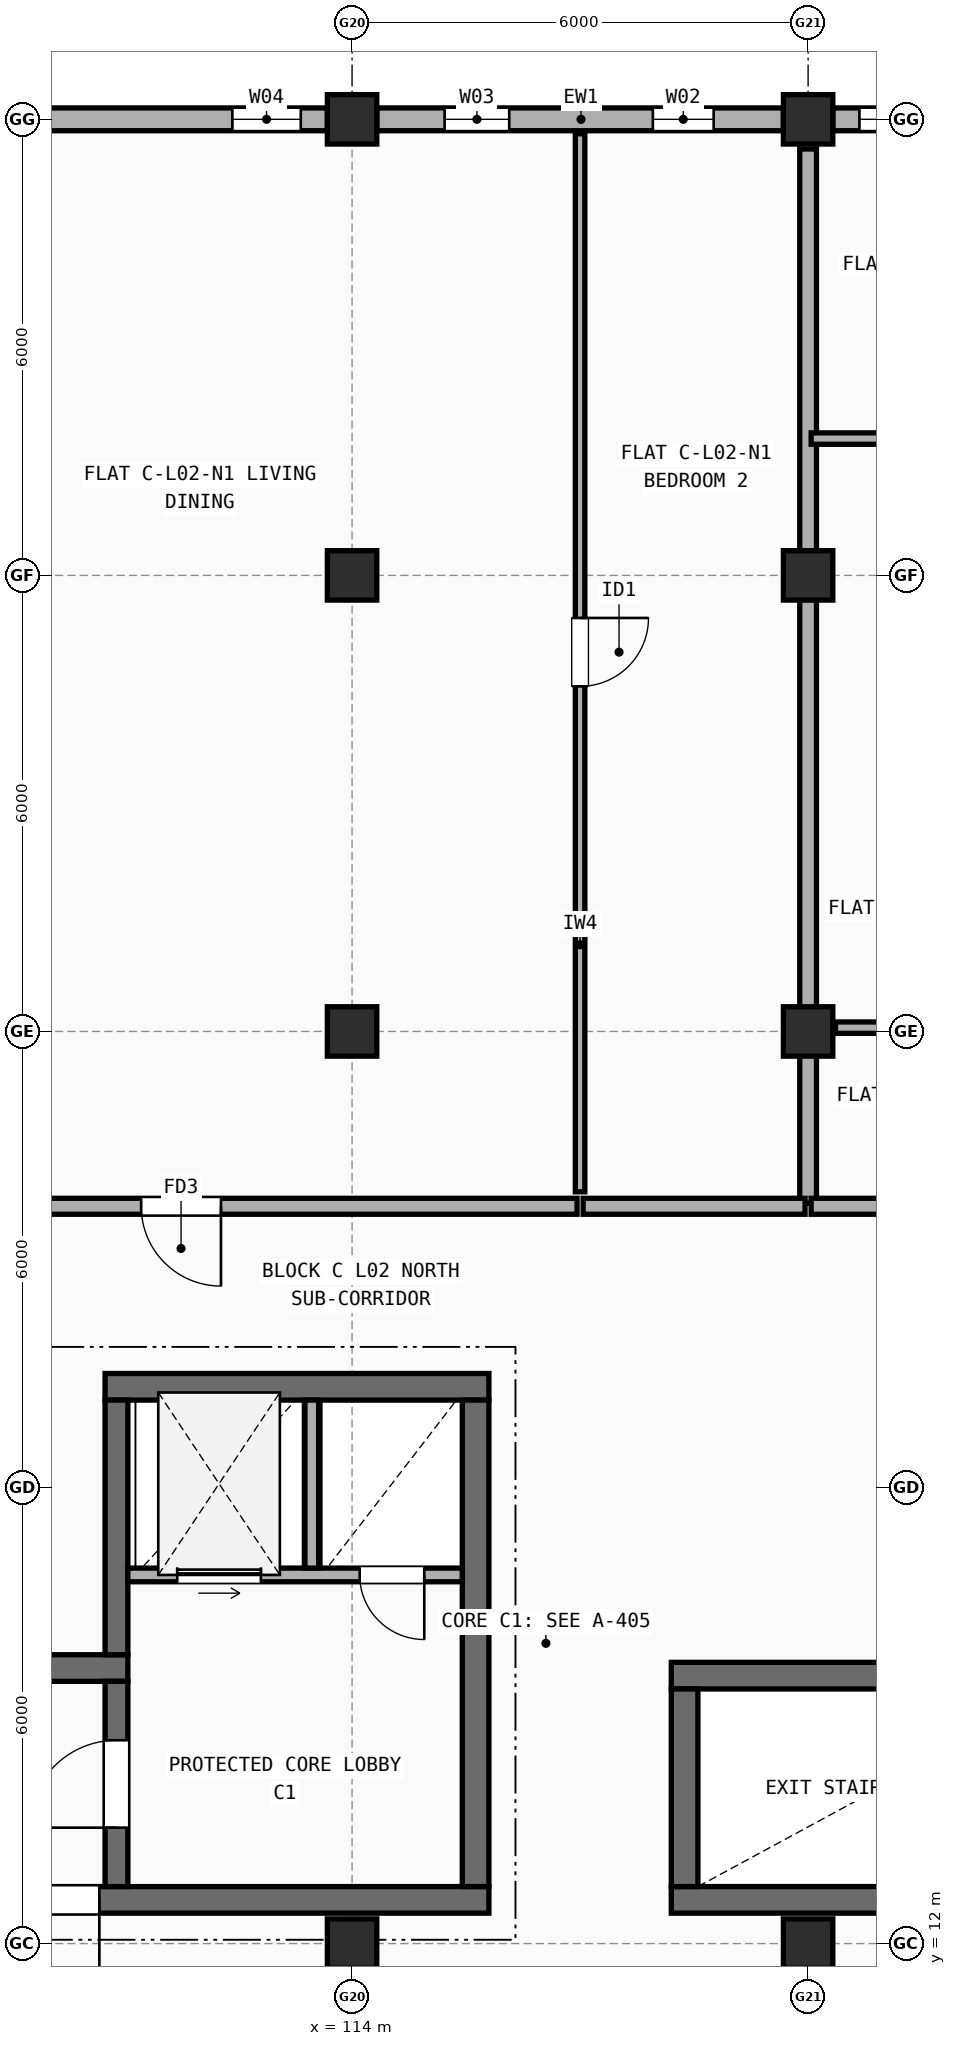
"""IFC4 building model, lengths in metres.
Left out: names, types, materials, properties, quantities, classifications, styles, units other than length and angle.
Written with IfcOpenShell. Run it as: python <this file> out.ifc"""

import sys

from ifc_helpers import new_model, si_unit, direction, frame, frame_2d, origin, origin_2d, place, context, subcontext, project, spatial, rectangle, extrude, element, fill, save


model = new_model("IFC4")
c1 = context("Model", 3, precision=1e-05, world=origin(), true_north=direction((0.0, 1.0)))
c2 = subcontext(c1, "Body", "Model", "MODEL_VIEW")
j1 = project(units=[si_unit("LENGTHUNIT", "METRE"), si_unit("PLANEANGLEUNIT", "RADIAN")], contexts=[c1])
p1 = place(None, origin())
s1 = spatial("IfcSite", under=j1, at=p1, CompositionType="ELEMENT")
p2 = place(p1, origin())
s2 = spatial("IfcBuilding", under=s1, at=p2, CompositionType="ELEMENT")
p3 = place(p2, frame((0.0, 0.0, 7.7)))
s3 = spatial("IfcBuildingStorey", under=s2, at=p3, CompositionType="ELEMENT", Elevation=7.7)
for number, where, z_axis, x_axis in (
    (1, (114.0, 12.0, 0.0), (0.0, 0.0, 1.0), (1.0, 0.0, 0.0)),
    (2, (114.0, 24.0, 0.0), (0.0, 0.0, 1.0), (1.0, 0.0, 0.0)),
    (3, (114.0, 30.0, 0.0), (0.0, 0.0, 1.0), (1.0, 0.0, 0.0)),
    (4, (114.0, 36.0, 0.0), (0.0, 0.0, 1.0), (1.0, 0.0, 0.0)),
    (5, (120.0, 12.0, 0.0), (0.0, 0.0, 1.0), (1.0, 0.0, 0.0)),
    (6, (120.0, 24.0, 0.0), (0.0, 0.0, 1.0), (1.0, 0.0, 0.0)),
    (7, (120.0, 30.0, 0.0), (0.0, 0.0, 1.0), (1.0, 0.0, 0.0)),
    (8, (120.0, 36.0, 0.0), (0.0, 0.0, 1.0), (1.0, 0.0, 0.0)),
):
    element("IfcColumn", number, at=place(p3, frame(where, z_axis=z_axis, x_axis=x_axis)), inside=s3, PredefinedType="COLUMN", context=c2, shape_type="SweptSolid", body=[
        extrude(rectangle(XDim=0.65, YDim=0.65, at=origin_2d()), origin(), (0.0, 0.0, 1.0), 2.955),
    ])
p4 = place(p3, frame((125.675, 36.0, 0.0), z_axis=(0.0, 0.0, 1.0), x_axis=(-1.0, 0.0, 0.0)))
e9 = element("IfcWall", 9, at=p4, inside=s3, PredefinedType="STANDARD", context=c2, shape_type="SweptSolid", body=[
    extrude(rectangle(XDim=5.35, YDim=0.3, at=frame_2d((2.675, 0.0))), origin(), (0.0, 0.0, 1.0), 2.437),
])
p5 = place(p4, frame((1.565, 0.0, 0.9)))
e10 = element("IfcOpeningElement", 10, at=p5, cuts=e9, PredefinedType="OPENING", context=c2, shape_type="SweptSolid", body=[
    extrude(rectangle(XDim=1.05, YDim=1.35, at=frame_2d((0.525, 0.675))), frame((0.0, 0.16, 0.0), z_axis=(0.0, -1.0, 0.0), x_axis=(1.0, 0.0, 0.0)), (0.0, 0.0, 1.0), 0.32),
])
p6 = place(p4, frame((3.95, 0.0, 0.9)))
e11 = element("IfcOpeningElement", 11, at=p6, cuts=e9, PredefinedType="OPENING", context=c2, shape_type="SweptSolid", body=[
    extrude(rectangle(XDim=1.05, YDim=1.35, at=frame_2d((0.525, 0.675))), frame((0.0, 0.16, 0.0), z_axis=(0.0, -1.0, 0.0), x_axis=(1.0, 0.0, 0.0)), (0.0, 0.0, 1.0), 0.32),
])
p7 = place(p3, frame((119.675, 36.0, 0.0), z_axis=(0.0, 0.0, 1.0), x_axis=(-1.0, 0.0, 0.0)))
e12 = element("IfcWall", 12, at=p7, inside=s3, PredefinedType="STANDARD", context=c2, shape_type="SweptSolid", body=[
    extrude(rectangle(XDim=5.35, YDim=0.3, at=frame_2d((2.675, 0.0))), origin(), (0.0, 0.0, 1.0), 2.437),
])
p8 = place(p7, frame((0.917, 0.0, 0.9)))
e13 = element("IfcOpeningElement", 13, at=p8, cuts=e12, PredefinedType="OPENING", context=c2, shape_type="SweptSolid", body=[
    extrude(rectangle(XDim=0.8, YDim=1.2, at=frame_2d((0.4, 0.6))), frame((0.0, 0.16, 0.0), z_axis=(0.0, -1.0, 0.0), x_axis=(1.0, 0.0, 0.0)), (0.0, 0.0, 1.0), 0.32),
])
p9 = place(p7, frame((3.607, 0.0, 0.9)))
e14 = element("IfcOpeningElement", 14, at=p9, cuts=e12, PredefinedType="OPENING", context=c2, shape_type="SweptSolid", body=[
    extrude(rectangle(XDim=0.85, YDim=1.25, at=frame_2d((0.425, 0.625))), frame((0.0, 0.16, 0.0), z_axis=(0.0, -1.0, 0.0), x_axis=(1.0, 0.0, 0.0)), (0.0, 0.0, 1.0), 0.32),
])
p10 = place(p3, frame((113.675, 36.0, 0.0), z_axis=(0.0, 0.0, 1.0), x_axis=(-1.0, 0.0, 0.0)))
e15 = element("IfcWall", 15, at=p10, inside=s3, PredefinedType="STANDARD", context=c2, shape_type="SweptSolid", body=[
    extrude(rectangle(XDim=5.35, YDim=0.3, at=frame_2d((2.675, 0.0))), origin(), (0.0, 0.0, 1.0), 2.437),
])
p11 = place(p10, frame((0.35, 0.0, 0.9)))
e16 = element("IfcOpeningElement", 16, at=p11, cuts=e15, PredefinedType="OPENING", context=c2, shape_type="SweptSolid", body=[
    extrude(rectangle(XDim=0.9, YDim=1.3, at=frame_2d((0.45, 0.65))), frame((0.0, 0.16, 0.0), z_axis=(0.0, -1.0, 0.0), x_axis=(1.0, 0.0, 0.0)), (0.0, 0.0, 1.0), 0.32),
])
p12 = place(p10, frame((4.1, 0.0, 0.9)))
e17 = element("IfcOpeningElement", 17, at=p12, cuts=e15, PredefinedType="OPENING", context=c2, shape_type="SweptSolid", body=[
    extrude(rectangle(XDim=0.9, YDim=1.3, at=frame_2d((0.45, 0.65))), frame((0.0, 0.16, 0.0), z_axis=(0.0, -1.0, 0.0), x_axis=(1.0, 0.0, 0.0)), (0.0, 0.0, 1.0), 0.32),
])
p13 = place(p3, frame((104.4, 12.575, 0.0), z_axis=(0.0, 0.0, 1.0), x_axis=(1.0, 0.0, 0.0)))
e18 = element("IfcWall", 18, at=p13, inside=s3, PredefinedType="SHEAR", context=c2, shape_type="SweptSolid", body=[
    extrude(rectangle(XDim=11.4, YDim=0.35, at=frame_2d((5.7, 0.0))), origin(), (0.0, 0.0, 1.0), 2.955),
])
p14 = place(p13, frame((5.125, 0.0, 0.0)))
e19 = element("IfcOpeningElement", 19, at=p14, cuts=e18, PredefinedType="OPENING", context=c2, shape_type="SweptSolid", body=[
    extrude(rectangle(XDim=1.15, YDim=2.15, at=frame_2d((0.575, 1.075))), frame((0.0, 0.185, 0.0), z_axis=(0.0, -1.0, 0.0), x_axis=(1.0, 0.0, 0.0)), (0.0, 0.0, 1.0), 0.37),
])
p15 = place(p3, frame((111.05, 15.625, 0.0), z_axis=(0.0, 0.0, 1.0), x_axis=(-1.0, 0.0, 0.0)))
e20 = element("IfcWall", 20, at=p15, inside=s3, PredefinedType="SHEAR", context=c2, shape_type="SweptSolid", body=[
    extrude(rectangle(XDim=6.65, YDim=0.35, at=frame_2d((3.325, 0.0))), origin(), (0.0, 0.0, 1.0), 2.955),
])
p16 = place(p3, frame((110.9, 12.75, 0.0), z_axis=(0.0, 0.0, 1.0), x_axis=(0.0, 1.0, 0.0)))
e21 = element("IfcWall", 21, at=p16, inside=s3, PredefinedType="SHEAR", context=c2, shape_type="SweptSolid", body=[
    extrude(rectangle(XDim=2.7, YDim=0.3, at=frame_2d((1.35, 0.0))), origin(), (0.0, 0.0, 1.0), 2.955),
])
p17 = place(p16, frame((0.775, 0.0, 0.0)))
e22 = element("IfcOpeningElement", 22, at=p17, cuts=e21, PredefinedType="OPENING", context=c2, shape_type="SweptSolid", body=[
    extrude(rectangle(XDim=1.15, YDim=2.15, at=frame_2d((0.575, 1.075))), frame((0.0, 0.16, 0.0), z_axis=(0.0, -1.0, 0.0), x_axis=(1.0, 0.0, 0.0)), (0.0, 0.0, 1.0), 0.32),
])
p18 = place(p3, frame((115.8, 19.325, 0.0), z_axis=(0.0, 0.0, 1.0), x_axis=(-1.0, 0.0, 0.0)))
e23 = element("IfcWall", 23, at=p18, inside=s3, PredefinedType="SHEAR", context=c2, shape_type="SweptSolid", body=[
    extrude(rectangle(XDim=5.05, YDim=0.35, at=frame_2d((2.525, 0.0))), origin(), (0.0, 0.0, 1.0), 2.955),
])
p19 = place(p3, frame((115.625, 12.75, 0.0), z_axis=(0.0, 0.0, 1.0), x_axis=(0.0, 1.0, 0.0)))
e24 = element("IfcWall", 24, at=p19, inside=s3, PredefinedType="SHEAR", context=c2, shape_type="SweptSolid", body=[
    extrude(rectangle(XDim=6.4, YDim=0.35, at=frame_2d((3.2, 0.0))), origin(), (0.0, 0.0, 1.0), 2.955),
])
p20 = place(p3, frame((110.9, 15.8, 0.0), z_axis=(0.0, 0.0, 1.0), x_axis=(0.0, 1.0, 0.0)))
e25 = element("IfcWall", 25, at=p20, inside=s3, PredefinedType="SHEAR", context=c2, shape_type="SweptSolid", body=[
    extrude(rectangle(XDim=3.35, YDim=0.3, at=frame_2d((1.675, 0.0))), origin(), (0.0, 0.0, 1.0), 2.955),
])
p21 = place(p3, frame((111.05, 16.85, 0.0), z_axis=(0.0, 0.0, 1.0), x_axis=(1.0, 0.0, 0.0)))
e26 = element("IfcWall", 26, at=p21, inside=s3, PredefinedType="SOLIDWALL", context=c2, shape_type="SweptSolid", body=[
    extrude(rectangle(XDim=4.4, YDim=0.18, at=frame_2d((2.2, 0.0))), origin(), (0.0, 0.0, 1.0), 2.955),
])
p22 = place(p21, frame((0.65, 0.0, 0.0)))
e27 = element("IfcOpeningElement", 27, at=p22, cuts=e26, PredefinedType="OPENING", context=c2, shape_type="SweptSolid", body=[
    extrude(rectangle(XDim=1.1, YDim=2.15, at=frame_2d((0.55, 1.075))), frame((0.0, 0.1, 0.0), z_axis=(0.0, -1.0, 0.0), x_axis=(1.0, 0.0, 0.0)), (0.0, 0.0, 1.0), 0.2),
])
p23 = place(p21, frame((3.05, 0.0, 0.0)))
e28 = element("IfcOpeningElement", 28, at=p23, cuts=e26, PredefinedType="OPENING", context=c2, shape_type="SweptSolid", body=[
    extrude(rectangle(XDim=0.85, YDim=2.1, at=frame_2d((0.425, 1.05))), frame((0.0, 0.1, 0.0), z_axis=(0.0, -1.0, 0.0), x_axis=(1.0, 0.0, 0.0)), (0.0, 0.0, 1.0), 0.2),
])
p24 = place(p3, frame((113.47, 16.94, 0.0), z_axis=(0.0, 0.0, 1.0), x_axis=(0.0, 1.0, 0.0)))
e29 = element("IfcWall", 29, at=p24, inside=s3, PredefinedType="SOLIDWALL", context=c2, shape_type="SweptSolid", body=[
    extrude(rectangle(XDim=2.21, YDim=0.18, at=frame_2d((1.105, 0.0))), origin(), (0.0, 0.0, 1.0), 2.955),
])
p25 = place(p3, frame((118.2, 12.575, 0.0), z_axis=(0.0, 0.0, 1.0), x_axis=(1.0, 0.0, 0.0)))
e30 = element("IfcWall", 30, at=p25, inside=s3, PredefinedType="SHEAR", context=c2, shape_type="SweptSolid", body=[
    extrude(rectangle(XDim=11.4, YDim=0.35, at=frame_2d((5.7, 0.0))), origin(), (0.0, 0.0, 1.0), 2.955),
])
p26 = place(p25, frame((5.1, 0.0, 0.0)))
e31 = element("IfcOpeningElement", 31, at=p26, cuts=e30, PredefinedType="OPENING", context=c2, shape_type="SweptSolid", body=[
    extrude(rectangle(XDim=1.2, YDim=2.15, at=frame_2d((0.6, 1.075))), frame((0.0, 0.185, 0.0), z_axis=(0.0, -1.0, 0.0), x_axis=(1.0, 0.0, 0.0)), (0.0, 0.0, 1.0), 0.37),
])
p27 = place(p3, frame((124.85, 15.525, 0.0), z_axis=(0.0, 0.0, 1.0), x_axis=(-1.0, 0.0, 0.0)))
e32 = element("IfcWall", 32, at=p27, inside=s3, PredefinedType="SHEAR", context=c2, shape_type="SweptSolid", body=[
    extrude(rectangle(XDim=6.65, YDim=0.35, at=frame_2d((3.325, 0.0))), origin(), (0.0, 0.0, 1.0), 2.955),
])
p28 = place(p3, frame((118.375, 15.35, 0.0), z_axis=(0.0, 0.0, 1.0), x_axis=(0.0, -1.0, 0.0)))
e33 = element("IfcWall", 33, at=p28, inside=s3, PredefinedType="SHEAR", context=c2, shape_type="SweptSolid", body=[
    extrude(rectangle(XDim=2.6, YDim=0.35, at=frame_2d((1.3, 0.0))), origin(), (0.0, 0.0, 1.0), 2.955),
])
p29 = place(p3, frame((120.0, 21.74, 0.0), z_axis=(0.0, 0.0, 1.0), x_axis=(0.0, 1.0, 0.0)))
e34 = element("IfcWall", 34, at=p29, inside=s3, PredefinedType="SOLIDWALL", context=c2, shape_type="SweptSolid", body=[
    extrude(rectangle(XDim=13.87, YDim=0.22, at=frame_2d((6.935, 0.0))), origin(), (0.0, 0.0, 1.0), 2.337),
])
p30 = place(p3, frame((106.54, 21.7, 0.0), z_axis=(0.0, 0.0, 1.0), x_axis=(1.0, 0.0, 0.0)))
e35 = element("IfcWall", 35, at=p30, inside=s3, PredefinedType="SOLIDWALL", context=c2, shape_type="SweptSolid", body=[
    extrude(rectangle(XDim=10.42, YDim=0.21, at=frame_2d((5.21, 0.0))), origin(), (0.0, 0.0, 1.0), 2.508),
])
p31 = place(p30, frame((4.685, 0.0, 0.0)))
e36 = element("IfcOpeningElement", 36, at=p31, cuts=e35, PredefinedType="OPENING", context=c2, shape_type="SweptSolid", body=[
    extrude(rectangle(XDim=1.05, YDim=2.15, at=frame_2d((0.525, 1.075))), frame((0.0, 0.115, 0.0), z_axis=(0.0, -1.0, 0.0), x_axis=(1.0, 0.0, 0.0)), (0.0, 0.0, 1.0), 0.23),
])
p32 = place(p3, frame((117.04, 21.7, 0.0), z_axis=(0.0, 0.0, 1.0), x_axis=(1.0, 0.0, 0.0)))
e37 = element("IfcWall", 37, at=p32, inside=s3, PredefinedType="SOLIDWALL", context=c2, shape_type="SweptSolid", body=[
    extrude(rectangle(XDim=2.92, YDim=0.21, at=frame_2d((1.46, 0.0))), origin(), (0.0, 0.0, 1.0), 2.955),
])
p33 = place(p3, frame((117.0, 21.89, 0.0), z_axis=(0.0, 0.0, 1.0), x_axis=(0.0, 1.0, 0.0)))
e38 = element("IfcWall", 38, at=p33, inside=s3, PredefinedType="PARTITIONING", context=c2, shape_type="SweptSolid", body=[
    extrude(rectangle(XDim=13.92, YDim=0.125, at=frame_2d((6.96, 0.0))), origin(), (0.0, 0.0, 1.0), 2.387),
])
p34 = place(p33, frame((6.65, 0.0, 0.0)))
e39 = element("IfcOpeningElement", 39, at=p34, cuts=e38, PredefinedType="OPENING", context=c2, shape_type="SweptSolid", body=[
    extrude(rectangle(XDim=0.9, YDim=2.1, at=frame_2d((0.45, 1.05))), frame((0.0, 0.073, 0.0), z_axis=(0.0, -1.0, 0.0), x_axis=(1.0, 0.0, 0.0)), (0.0, 0.0, 1.0), 0.145),
])
p35 = place(p3, frame((120.04, 21.7, 0.0), z_axis=(0.0, 0.0, 1.0), x_axis=(1.0, 0.0, 0.0)))
e40 = element("IfcWall", 40, at=p35, inside=s3, PredefinedType="SOLIDWALL", context=c2, shape_type="SweptSolid", body=[
    extrude(rectangle(XDim=4.42, YDim=0.21, at=frame_2d((2.21, 0.0))), origin(), (0.0, 0.0, 1.0), 2.955),
])
p36 = place(p3, frame((120.04, 31.8, 0.0), z_axis=(0.0, 0.0, 1.0), x_axis=(1.0, 0.0, 0.0)))
e41 = element("IfcWall", 41, at=p36, inside=s3, PredefinedType="PARTITIONING", context=c2, shape_type="SweptSolid", body=[
    extrude(rectangle(XDim=4.42, YDim=0.15, at=frame_2d((2.21, 0.0))), origin(), (0.0, 0.0, 1.0), 2.337),
])
p37 = place(p3, frame((120.36, 24.05, 0.0), z_axis=(0.0, 0.0, 1.0), x_axis=(1.0, 0.0, 0.0)))
e42 = element("IfcWall", 42, at=p37, inside=s3, PredefinedType="PARTITIONING", context=c2, shape_type="SweptSolid", body=[
    extrude(rectangle(XDim=4.1, YDim=0.15, at=frame_2d((2.05, 0.0))), origin(), (0.0, 0.0, 1.0), 2.387),
])
p38 = place(p6, origin())
e43 = element("IfcWindow", 43, at=p38, inside=s3, PartitioningType="SINGLE_PANEL", PredefinedType="WINDOW", context=c2, shape_type="SweptSolid", body=[
    extrude(rectangle(XDim=1.05, YDim=1.35, at=frame_2d((0.525, 0.675))), frame((0.0, 0.03, 0.0), z_axis=(0.0, -1.0, 0.0), x_axis=(1.0, 0.0, 0.0)), (0.0, 0.0, 1.0), 0.06),
])
fill(e11, e43)
p39 = place(p8, origin())
e44 = element("IfcWindow", 44, at=p39, inside=s3, PartitioningType="SINGLE_PANEL", PredefinedType="WINDOW", context=c2, shape_type="SweptSolid", body=[
    extrude(rectangle(XDim=0.8, YDim=1.2, at=frame_2d((0.4, 0.6))), frame((0.0, 0.03, 0.0), z_axis=(0.0, -1.0, 0.0), x_axis=(1.0, 0.0, 0.0)), (0.0, 0.0, 1.0), 0.06),
])
fill(e13, e44)
p40 = place(p9, origin())
e45 = element("IfcWindow", 45, at=p40, inside=s3, PartitioningType="SINGLE_PANEL", PredefinedType="WINDOW", context=c2, shape_type="SweptSolid", body=[
    extrude(rectangle(XDim=0.85, YDim=1.25, at=frame_2d((0.425, 0.625))), frame((0.0, 0.03, 0.0), z_axis=(0.0, -1.0, 0.0), x_axis=(1.0, 0.0, 0.0)), (0.0, 0.0, 1.0), 0.06),
])
fill(e14, e45)
p41 = place(p11, origin())
e46 = element("IfcWindow", 46, at=p41, inside=s3, PartitioningType="SINGLE_PANEL", PredefinedType="WINDOW", context=c2, shape_type="SweptSolid", body=[
    extrude(rectangle(XDim=0.9, YDim=1.3, at=frame_2d((0.45, 0.65))), frame((0.0, 0.03, 0.0), z_axis=(0.0, -1.0, 0.0), x_axis=(1.0, 0.0, 0.0)), (0.0, 0.0, 1.0), 0.06),
])
fill(e16, e46)
p42 = place(p14, origin())
e47 = element("IfcDoor", 47, at=p42, inside=s3, OperationType="SINGLE_SWING_RIGHT", PredefinedType="DOOR", context=c2, shape_type="SweptSolid", body=[
    extrude(rectangle(XDim=1.15, YDim=2.15, at=frame_2d((0.575, 1.075))), frame((0.0, 0.025, 0.0), z_axis=(0.0, -1.0, 0.0), x_axis=(1.0, 0.0, 0.0)), (0.0, 0.0, 1.0), 0.05),
])
fill(e19, e47)
p43 = place(p17, origin())
e48 = element("IfcDoor", 48, at=p43, inside=s3, OperationType="SINGLE_SWING_LEFT", PredefinedType="DOOR", context=c2, shape_type="SweptSolid", body=[
    extrude(rectangle(XDim=1.15, YDim=2.15, at=frame_2d((0.575, 1.075))), frame((0.0, 0.025, 0.0), z_axis=(0.0, -1.0, 0.0), x_axis=(1.0, 0.0, 0.0)), (0.0, 0.0, 1.0), 0.05),
])
fill(e22, e48)
p44 = place(p22, origin())
e49 = element("IfcDoor", 49, at=p44, inside=s3, OperationType="SLIDING_TO_LEFT", PredefinedType="DOOR", context=c2, shape_type="SweptSolid", body=[
    extrude(rectangle(XDim=1.1, YDim=2.15, at=frame_2d((0.55, 1.075))), frame((0.0, 0.025, 0.0), z_axis=(0.0, -1.0, 0.0), x_axis=(1.0, 0.0, 0.0)), (0.0, 0.0, 1.0), 0.05),
])
fill(e27, e49)
p45 = place(p23, frame((0.85, 0.0, 0.0), z_axis=(0.0, 0.0, 1.0), x_axis=(-1.0, 0.0, 0.0)))
e50 = element("IfcDoor", 50, at=p45, inside=s3, OperationType="SINGLE_SWING_RIGHT", PredefinedType="DOOR", context=c2, shape_type="SweptSolid", body=[
    extrude(rectangle(XDim=0.85, YDim=2.1, at=frame_2d((0.425, 1.05))), frame((0.0, 0.025, 0.0), z_axis=(0.0, -1.0, 0.0), x_axis=(1.0, 0.0, 0.0)), (0.0, 0.0, 1.0), 0.05),
])
fill(e28, e50)
p46 = place(p31, origin())
e51 = element("IfcDoor", 51, at=p46, inside=s3, OperationType="SINGLE_SWING_RIGHT", PredefinedType="DOOR", context=c2, shape_type="SweptSolid", body=[
    extrude(rectangle(XDim=1.05, YDim=2.15, at=frame_2d((0.525, 1.075))), frame((0.0, 0.025, 0.0), z_axis=(0.0, -1.0, 0.0), x_axis=(1.0, 0.0, 0.0)), (0.0, 0.0, 1.0), 0.05),
])
fill(e36, e51)
p47 = place(p34, origin())
e52 = element("IfcDoor", 52, at=p47, inside=s3, OperationType="SINGLE_SWING_RIGHT", PredefinedType="DOOR", context=c2, shape_type="SweptSolid", body=[
    extrude(rectangle(XDim=0.9, YDim=2.1, at=frame_2d((0.45, 1.05))), frame((0.0, 0.025, 0.0), z_axis=(0.0, -1.0, 0.0), x_axis=(1.0, 0.0, 0.0)), (0.0, 0.0, 1.0), 0.05),
])
fill(e39, e52)
save(model, sys.argv[1])
